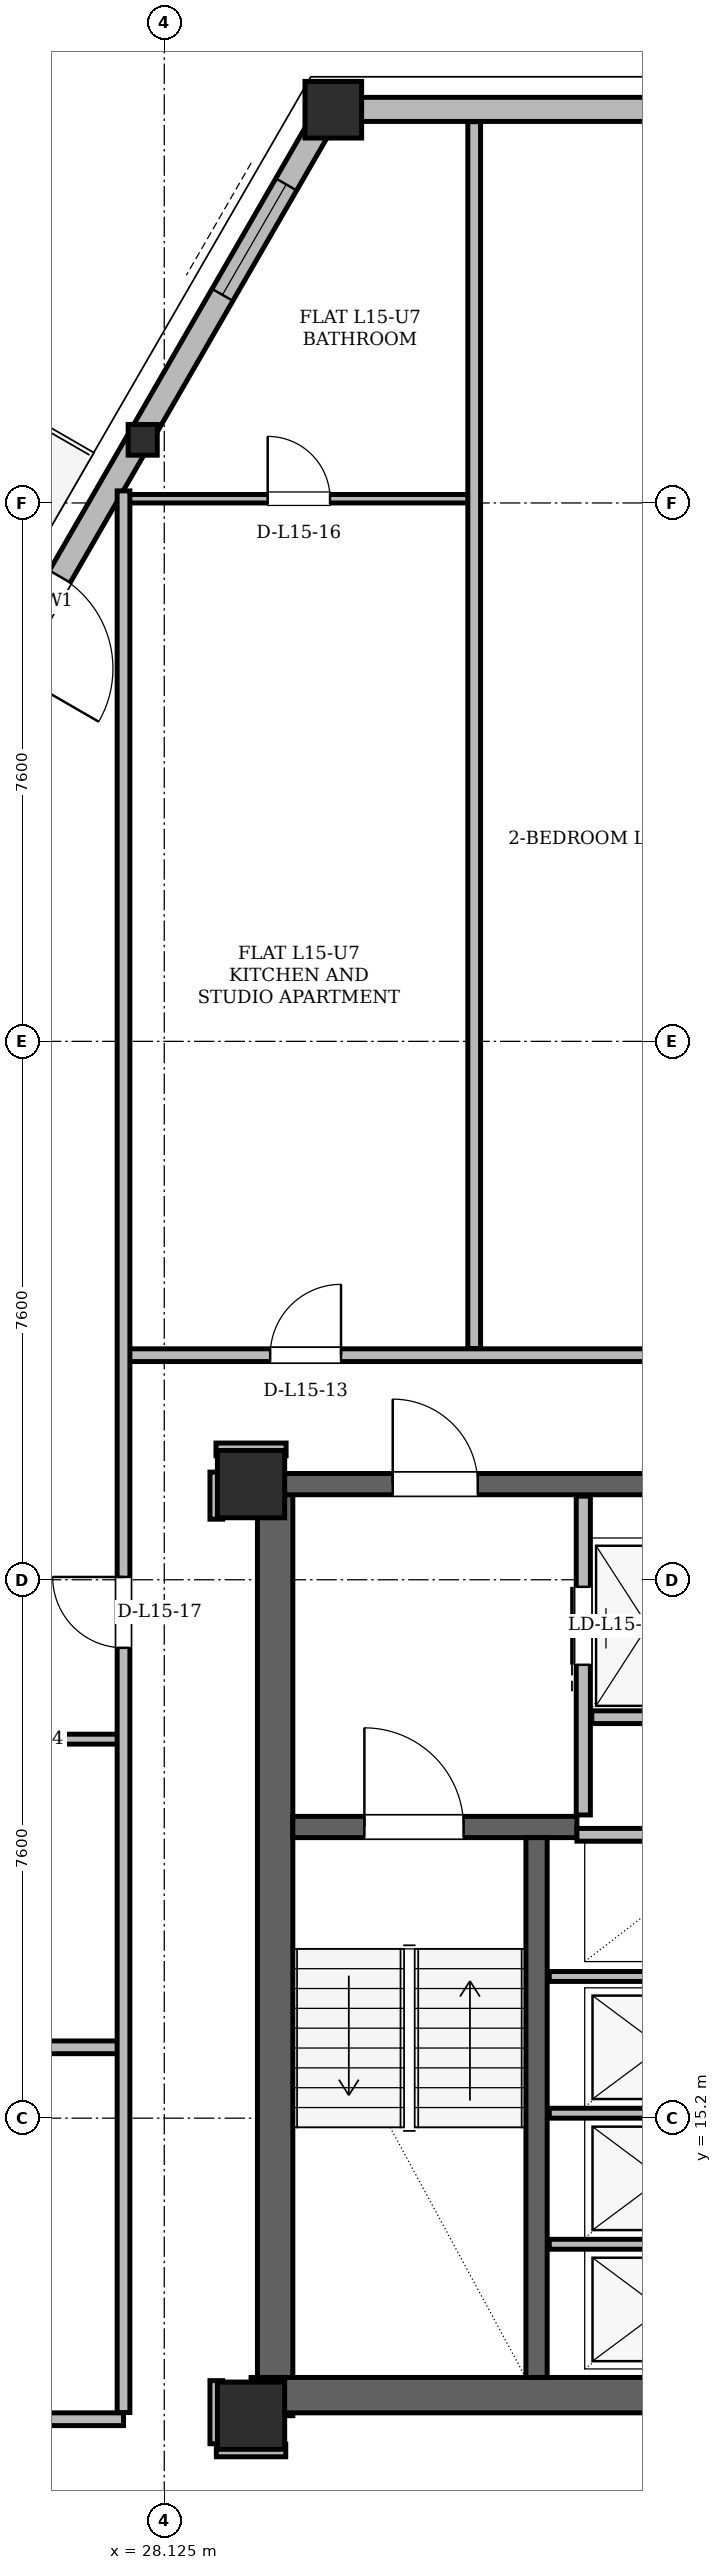
"""IFC4 building model, lengths in metres.
Left out: names, types, materials, properties, quantities, classifications, styles, units other than length and angle.
Written with IfcOpenShell. Run it as: python <this file> out.ifc"""

import sys

from ifc_helpers import new_model, si_unit, direction, frame, frame_2d, origin, origin_2d, place, context, subcontext, project, spatial, rectangle, hollow_rectangle, i_section, extrude, element, fill, save


model = new_model("IFC4")
c1 = context("Model", 3, precision=1e-05, world=origin(), true_north=direction((0.0, 1.0)))
c2 = subcontext(c1, "Body", "Model", "MODEL_VIEW")
j1 = project(units=[si_unit("LENGTHUNIT", "METRE"), si_unit("PLANEANGLEUNIT", "RADIAN")], contexts=[c1])
p1 = place(None, origin())
s1 = spatial("IfcSite", under=j1, at=p1, CompositionType="ELEMENT")
p2 = place(p1, origin())
s2 = spatial("IfcBuilding", under=s1, at=p2, CompositionType="ELEMENT")
p3 = place(p2, frame((0.0, 0.0, 59.7)))
s3 = spatial("IfcBuildingStorey", under=s2, at=p3, CompositionType="ELEMENT", Elevation=59.7)
for number, where, z_axis, x_axis in (
    (1, (29.35, 11.0, 0.0), (0.0, 0.0, 1.0), (1.0, 0.0, 0.0)),
    (2, (29.35, 24.15, 0.0), (0.0, 0.0, 1.0), (1.0, 0.0, 0.0)),
):
    element("IfcColumn", number, at=place(p3, frame(where, z_axis=z_axis, x_axis=x_axis)), inside=s3, PredefinedType="COLUMN", context=c2, shape_type="SweptSolid", body=[
        extrude(hollow_rectangle(XDim=0.95, YDim=0.95, WallThickness=0.08, at=origin_2d()), origin(), (0.0, 0.0, 1.0), 3.6),
    ])
p4 = place(p3, frame((30.458, 43.556, 0.005), z_axis=(0.029494809359, -0.002650455219, 0.999561419478), x_axis=(0.089501110996, 0.995986722367, 0.0)))
e3 = element("IfcColumn", 3, at=p4, inside=s3, PredefinedType="COLUMN", context=c2, shape_type="SweptSolid", body=[
    extrude(hollow_rectangle(XDim=0.8, YDim=0.8, WallThickness=0.065, at=origin_2d()), origin(), (0.0, 0.0, 1.0), 3.592),
])
p5 = place(p3, frame((27.771, 38.902, 0.005), z_axis=(0.027525097831, -0.006048725202, 0.999602812077), x_axis=(0.214631750704, 0.976695045339, 0.0)))
e4 = element("IfcColumn", 4, at=p5, inside=s3, PredefinedType="COLUMN", context=c2, shape_type="SweptSolid", body=[
    extrude(i_section(OverallWidth=0.411, OverallDepth=0.434, WebThickness=0.036, FlangeThickness=0.057, at=origin_2d()), origin(), (0.0, 0.0, 1.0), 3.592),
])
p6 = place(p3, frame((29.69, 11.0, 0.0), z_axis=(0.0, 0.0, 1.0), x_axis=(0.0, 1.0, 0.0)))
e5 = element("IfcWall", 5, at=p6, inside=s3, PredefinedType="SHEAR", context=c2, shape_type="SweptSolid", body=[
    extrude(rectangle(XDim=13.3, YDim=0.5, at=frame_2d((6.65, 0.0))), origin(), (0.0, 0.0, 1.0), 3.36),
])
p7 = place(p3, frame((29.35, 11.29, 0.0), z_axis=(0.0, 0.0, 1.0), x_axis=(1.0, 0.0, 0.0)))
e6 = element("IfcWall", 6, at=p7, inside=s3, PredefinedType="SHEAR", context=c2, shape_type="SweptSolid", body=[
    extrude(rectangle(XDim=7.1, YDim=0.5, at=frame_2d((3.55, 0.0))), origin(), (0.0, 0.0, 1.0), 3.36),
])
p8 = place(p3, frame((29.65, 24.15, 0.0), z_axis=(0.0, 0.0, 1.0), x_axis=(1.0, 0.0, 0.0)))
e7 = element("IfcWall", 7, at=p8, inside=s3, PredefinedType="SHEAR", context=c2, shape_type="SweptSolid", body=[
    extrude(rectangle(XDim=15.7, YDim=0.3, at=frame_2d((7.85, 0.0))), origin(), (0.0, 0.0, 1.0), 3.36),
])
p9 = place(p8, frame((1.7, 0.0, 0.0)))
e8 = element("IfcOpeningElement", 8, at=p9, cuts=e7, PredefinedType="OPENING", context=c2, shape_type="SweptSolid", body=[
    extrude(rectangle(XDim=1.2, YDim=2.2, at=frame_2d((0.6, 1.1))), frame((0.0, 0.15, 0.0), z_axis=(0.0, -1.0, 0.0), x_axis=(1.0, 0.0, 0.0)), (0.0, 0.0, 1.0), 0.3),
])
p10 = place(p8, frame((12.8, 0.0, 0.0)))
e9 = element("IfcOpeningElement", 9, at=p10, cuts=e7, PredefinedType="OPENING", context=c2, shape_type="SweptSolid", body=[
    extrude(rectangle(XDim=1.2, YDim=2.2, at=frame_2d((0.6, 1.1))), frame((0.0, 0.15, 0.0), z_axis=(0.0, -1.0, 0.0), x_axis=(1.0, 0.0, 0.0)), (0.0, 0.0, 1.0), 0.3),
])
p11 = place(p8, frame((6.55, 0.0, 0.0)))
e10 = element("IfcOpeningElement", 10, at=p11, cuts=e7, PredefinedType="OPENING", context=c2, shape_type="SweptSolid", body=[
    extrude(rectangle(XDim=0.9, YDim=2.05, at=frame_2d((0.45, 1.025))), frame((0.0, 0.15, 0.0), z_axis=(0.0, -1.0, 0.0), x_axis=(1.0, 0.0, 0.0)), (0.0, 0.0, 1.0), 0.3),
])
p12 = place(p8, frame((8.45, 0.0, 0.0)))
e11 = element("IfcOpeningElement", 11, at=p12, cuts=e7, PredefinedType="OPENING", context=c2, shape_type="SweptSolid", body=[
    extrude(rectangle(XDim=0.9, YDim=2.05, at=frame_2d((0.45, 1.025))), frame((0.0, 0.15, 0.0), z_axis=(0.0, -1.0, 0.0), x_axis=(1.0, 0.0, 0.0)), (0.0, 0.0, 1.0), 0.3),
])
p13 = place(p3, frame((29.94, 19.31, 0.0), z_axis=(0.0, 0.0, 1.0), x_axis=(1.0, 0.0, 0.0)))
e12 = element("IfcWall", 12, at=p13, inside=s3, PredefinedType="SHEAR", context=c2, shape_type="SweptSolid", body=[
    extrude(rectangle(XDim=4.01, YDim=0.3, at=frame_2d((2.005, 0.0))), origin(), (0.0, 0.0, 1.0), 3.36),
])
p14 = place(p13, frame((1.01, 0.0, 0.0)))
e13 = element("IfcOpeningElement", 13, at=p14, cuts=e12, PredefinedType="OPENING", context=c2, shape_type="SweptSolid", body=[
    extrude(rectangle(XDim=1.4, YDim=2.2, at=frame_2d((0.7, 1.1))), frame((0.0, 0.15, 0.0), z_axis=(0.0, -1.0, 0.0), x_axis=(1.0, 0.0, 0.0)), (0.0, 0.0, 1.0), 0.3),
])
p15 = place(p3, frame((33.38, 11.54, 0.0), z_axis=(0.0, 0.0, 1.0), x_axis=(0.0, 1.0, 0.0)))
e14 = element("IfcWall", 14, at=p15, inside=s3, PredefinedType="SHEAR", context=c2, shape_type="SweptSolid", body=[
    extrude(rectangle(XDim=7.62, YDim=0.3, at=frame_2d((3.81, 0.0))), origin(), (0.0, 0.0, 1.0), 3.36),
])
p16 = place(p3, frame((44.542, 43.556, 0.0), z_axis=(0.0, 0.0, 1.0), x_axis=(-1.0, 0.0, 0.0)))
e15 = element("IfcWall", 15, at=p16, inside=s3, PredefinedType="SOLIDWALL", context=c2, shape_type="SweptSolid", body=[
    extrude(rectangle(XDim=14.083, YDim=0.34, at=frame_2d((7.042, 0.0))), origin(), (0.0, 0.0, 1.0), 2.494),
])
p17 = place(p16, frame((7.992, 0.0, 0.85)))
e16 = element("IfcOpeningElement", 16, at=p17, cuts=e15, PredefinedType="OPENING", context=c2, shape_type="SweptSolid", body=[
    extrude(rectangle(XDim=1.2, YDim=1.48, at=frame_2d((0.6, 0.74))), frame((0.0, 0.17, 0.0), z_axis=(0.0, -1.0, 0.0), x_axis=(1.0, 0.0, 0.0)), (0.0, 0.0, 1.0), 0.34),
])
p18 = place(p3, frame((30.458, 43.556, 0.0), z_axis=(0.0, 0.0, 1.0), x_axis=(-0.499999743921, -0.866025551632, 0.0)))
e17 = element("IfcWall", 17, at=p18, inside=s3, PredefinedType="SOLIDWALL", context=c2, shape_type="SweptSolid", body=[
    extrude(rectangle(XDim=33.585, YDim=0.34, at=frame_2d((16.792, 0.0))), origin(), (0.0, 0.0, 1.0), 2.494),
])
p19 = place(p18, frame((7.615, 0.0, 0.0)))
e18 = element("IfcOpeningElement", 18, at=p19, cuts=e17, PredefinedType="OPENING", context=c2, shape_type="SweptSolid", body=[
    extrude(rectangle(XDim=1.5, YDim=2.2, at=frame_2d((0.75, 1.1))), frame((0.0, 0.17, 0.0), z_axis=(0.0, -1.0, 0.0), x_axis=(1.0, 0.0, 0.0)), (0.0, 0.0, 1.0), 0.34),
])
p20 = place(p18, frame((29.075, 0.0, 0.0)))
e19 = element("IfcOpeningElement", 19, at=p20, cuts=e17, PredefinedType="OPENING", context=c2, shape_type="SweptSolid", body=[
    extrude(rectangle(XDim=1.5, YDim=2.2, at=frame_2d((0.75, 1.1))), frame((0.0, 0.17, 0.0), z_axis=(0.0, -1.0, 0.0), x_axis=(1.0, 0.0, 0.0)), (0.0, 0.0, 1.0), 0.34),
])
p21 = place(p18, frame((11.943, 0.0, 0.85)))
e20 = element("IfcOpeningElement", 20, at=p21, cuts=e17, PredefinedType="OPENING", context=c2, shape_type="SweptSolid", body=[
    extrude(rectangle(XDim=1.8, YDim=1.534, at=frame_2d((0.9, 0.767))), frame((0.0, 0.17, 0.0), z_axis=(0.0, -1.0, 0.0), x_axis=(1.0, 0.0, 0.0)), (0.0, 0.0, 1.0), 0.34),
])
p22 = place(p18, frame((19.036, 0.0, 0.85)))
e21 = element("IfcOpeningElement", 21, at=p22, cuts=e17, PredefinedType="OPENING", context=c2, shape_type="SweptSolid", body=[
    extrude(rectangle(XDim=1.2, YDim=1.48, at=frame_2d((0.6, 0.74))), frame((0.0, 0.17, 0.0), z_axis=(0.0, -1.0, 0.0), x_axis=(1.0, 0.0, 0.0)), (0.0, 0.0, 1.0), 0.34),
])
p23 = place(p18, frame((1.223, 0.0, 0.85)))
e22 = element("IfcOpeningElement", 22, at=p23, cuts=e17, PredefinedType="OPENING", context=c2, shape_type="SweptSolid", body=[
    extrude(rectangle(XDim=1.8, YDim=1.534, at=frame_2d((0.9, 0.767))), frame((0.0, 0.17, 0.0), z_axis=(0.0, -1.0, 0.0), x_axis=(1.0, 0.0, 0.0)), (0.0, 0.0, 1.0), 0.34),
])
p24 = place(p3, frame((34.04, 19.48, 0.0), z_axis=(0.0, 0.0, 1.0), x_axis=(0.0, 1.0, 0.0)))
e23 = element("IfcWall", 23, at=p24, inside=s3, PredefinedType="PARTITIONING", context=c2, shape_type="SweptSolid", body=[
    extrude(rectangle(XDim=4.5, YDim=0.2, at=frame_2d((2.25, 0.0))), origin(), (0.0, 0.0, 1.0), 2.4),
])
p25 = place(p24, frame((2.12, 0.0, 0.0)))
e24 = element("IfcOpeningElement", 24, at=p25, cuts=e23, PredefinedType="OPENING", context=c2, shape_type="SweptSolid", body=[
    extrude(rectangle(XDim=1.1, YDim=2.2, at=frame_2d((0.55, 1.1))), frame((0.0, 0.1, 0.0), z_axis=(0.0, -1.0, 0.0), x_axis=(1.0, 0.0, 0.0)), (0.0, 0.0, 1.0), 0.2),
])
p26 = place(p3, frame((34.16, 20.86, 0.0), z_axis=(0.0, 0.0, 1.0), x_axis=(1.0, 0.0, 0.0)))
e25 = element("IfcWall", 25, at=p26, inside=s3, PredefinedType="PARTITIONING", context=c2, shape_type="SweptSolid", body=[
    extrude(rectangle(XDim=1.58, YDim=0.18, at=frame_2d((0.79, 0.0))), origin(), (0.0, 0.0, 1.0), 3.36),
])
p27 = place(p3, frame((33.95, 19.2, 0.0), z_axis=(0.0, 0.0, 1.0), x_axis=(1.0, 0.0, 0.0)))
e26 = element("IfcWall", 26, at=p27, inside=s3, PredefinedType="PARTITIONING", context=c2, shape_type="SweptSolid", body=[
    extrude(rectangle(XDim=2.27, YDim=0.18, at=frame_2d((1.135, 0.0))), origin(), (0.0, 0.0, 1.0), 3.36),
])
for number, where, z_axis, x_axis in (
    (27, (33.56, 13.42, 0.0), (0.0, 0.0, 1.0), (1.0, 0.0, 0.0)),
    (28, (33.56, 15.27, 0.0), (0.0, 0.0, 1.0), (1.0, 0.0, 0.0)),
    (29, (33.56, 17.2, 0.0), (0.0, 0.0, 1.0), (1.0, 0.0, 0.0)),
):
    element("IfcWall", number, at=place(p3, frame(where, z_axis=z_axis, x_axis=x_axis)), inside=s3, PredefinedType="PARTITIONING", context=c2, shape_type="SweptSolid", body=[
        extrude(rectangle(XDim=2.66, YDim=0.14, at=frame_2d((1.33, 0.0))), origin(), (0.0, 0.0, 1.0), 3.36),
    ])
p28 = place(p3, frame((28.86, 10.51, 0.0), z_axis=(0.0, 0.0, 1.0), x_axis=(1.0, 0.0, 0.0)))
e30 = element("IfcWall", 30, at=p28, inside=s3, PredefinedType="PARTITIONING", context=c2, shape_type="SweptSolid", body=[
    extrude(rectangle(XDim=0.98, YDim=0.18, at=frame_2d((0.49, 0.0))), origin(), (0.0, 0.0, 1.0), 2.738),
])
p29 = place(p3, frame((19.2, 10.95, 0.0), z_axis=(0.0, 0.0, 1.0), x_axis=(1.0, 0.0, 0.0)))
e31 = element("IfcWall", 31, at=p29, inside=s3, PredefinedType="PARTITIONING", context=c2, shape_type="SweptSolid", body=[
    extrude(rectangle(XDim=8.35, YDim=0.18, at=frame_2d((4.175, 0.0))), origin(), (0.0, 0.0, 1.0), 3.36),
])
p30 = place(p3, frame((14.865, 16.2, 0.0), z_axis=(0.0, 0.0, 1.0), x_axis=(1.0, 0.0, 0.0)))
e32 = element("IfcWall", 32, at=p30, inside=s3, PredefinedType="PARTITIONING", context=c2, shape_type="SweptSolid", body=[
    extrude(rectangle(XDim=12.685, YDim=0.18, at=frame_2d((6.342, 0.0))), origin(), (0.0, 0.0, 1.0), 2.946),
])
p31 = place(p3, frame((17.377, 20.55, 0.0), z_axis=(0.0, 0.0, 1.0), x_axis=(1.0, 0.0, 0.0)))
e33 = element("IfcWall", 33, at=p31, inside=s3, PredefinedType="PARTITIONING", context=c2, shape_type="SweptSolid", body=[
    extrude(rectangle(XDim=10.223, YDim=0.14, at=frame_2d((5.112, 0.0))), origin(), (0.0, 0.0, 1.0), 3.36),
])
p32 = place(p31, frame((0.462, 0.0, 0.0)))
e34 = element("IfcOpeningElement", 34, at=p32, cuts=e33, PredefinedType="OPENING", context=c2, shape_type="SweptSolid", body=[
    extrude(rectangle(XDim=0.88, YDim=2.08, at=frame_2d((0.44, 1.04))), frame((0.0, 0.07, 0.0), z_axis=(0.0, -1.0, 0.0), x_axis=(1.0, 0.0, 0.0)), (0.0, 0.0, 1.0), 0.14),
])
p33 = place(p31, frame((2.412, 0.0, 0.0)))
e35 = element("IfcOpeningElement", 35, at=p33, cuts=e33, PredefinedType="OPENING", context=c2, shape_type="SweptSolid", body=[
    extrude(rectangle(XDim=0.95, YDim=2.1, at=frame_2d((0.475, 1.05))), frame((0.0, 0.07, 0.0), z_axis=(0.0, -1.0, 0.0), x_axis=(1.0, 0.0, 0.0)), (0.0, 0.0, 1.0), 0.14),
])
p34 = place(p31, frame((6.598, 0.0, 0.0)))
e36 = element("IfcOpeningElement", 36, at=p34, cuts=e33, PredefinedType="OPENING", context=c2, shape_type="SweptSolid", body=[
    extrude(rectangle(XDim=0.92, YDim=2.12, at=frame_2d((0.46, 1.06))), frame((0.0, 0.07, 0.0), z_axis=(0.0, -1.0, 0.0), x_axis=(1.0, 0.0, 0.0)), (0.0, 0.0, 1.0), 0.14),
])
p35 = place(p3, frame((28.855, 24.64, 0.0), z_axis=(0.0, 0.0, 1.0), x_axis=(1.0, 0.0, 0.0)))
e37 = element("IfcWall", 37, at=p35, inside=s3, PredefinedType="PARTITIONING", context=c2, shape_type="SweptSolid", body=[
    extrude(rectangle(XDim=0.99, YDim=0.18, at=frame_2d((0.495, 0.0))), origin(), (0.0, 0.0, 1.0), 2.738),
])
p36 = place(p3, frame((27.55, 25.97, 0.0), z_axis=(0.0, 0.0, 1.0), x_axis=(1.0, 0.0, 0.0)))
e38 = element("IfcWall", 38, at=p36, inside=s3, PredefinedType="PARTITIONING", context=c2, shape_type="SweptSolid", body=[
    extrude(rectangle(XDim=19.9, YDim=0.18, at=frame_2d((9.95, 0.0))), origin(), (0.0, 0.0, 1.0), 2.738),
])
p37 = place(p36, frame((2.07, 0.0, 0.0)))
e39 = element("IfcOpeningElement", 39, at=p37, cuts=e38, PredefinedType="OPENING", context=c2, shape_type="SweptSolid", body=[
    extrude(rectangle(XDim=1.0, YDim=2.18, at=frame_2d((0.5, 1.09))), frame((0.0, 0.09, 0.0), z_axis=(0.0, -1.0, 0.0), x_axis=(1.0, 0.0, 0.0)), (0.0, 0.0, 1.0), 0.18),
])
p38 = place(p36, frame((7.851, 0.0, 0.0)))
e40 = element("IfcOpeningElement", 40, at=p38, cuts=e38, PredefinedType="OPENING", context=c2, shape_type="SweptSolid", body=[
    extrude(rectangle(XDim=1.0, YDim=2.18, at=frame_2d((0.5, 1.09))), frame((0.0, 0.09, 0.0), z_axis=(0.0, -1.0, 0.0), x_axis=(1.0, 0.0, 0.0)), (0.0, 0.0, 1.0), 0.18),
])
p39 = place(p36, frame((16.916, 0.0, 0.0)))
e41 = element("IfcOpeningElement", 41, at=p39, cuts=e38, PredefinedType="OPENING", context=c2, shape_type="SweptSolid", body=[
    extrude(rectangle(XDim=1.0, YDim=2.18, at=frame_2d((0.5, 1.09))), frame((0.0, 0.09, 0.0), z_axis=(0.0, -1.0, 0.0), x_axis=(1.0, 0.0, 0.0)), (0.0, 0.0, 1.0), 0.18),
])
p40 = place(p3, frame((27.486, 38.06, 0.0), z_axis=(0.0, 0.0, 1.0), x_axis=(1.0, 0.0, 0.0)))
e42 = element("IfcWall", 42, at=p40, inside=s3, PredefinedType="PARTITIONING", context=c2, shape_type="SweptSolid", body=[
    extrude(rectangle(XDim=5.096, YDim=0.12, at=frame_2d((2.548, 0.0))), origin(), (0.0, 0.0, 1.0), 2.738),
])
p41 = place(p40, frame((2.099, 0.0, 0.0)))
e43 = element("IfcOpeningElement", 43, at=p41, cuts=e42, PredefinedType="OPENING", context=c2, shape_type="SweptSolid", body=[
    extrude(rectangle(XDim=0.88, YDim=2.08, at=frame_2d((0.44, 1.04))), frame((0.0, 0.06, 0.0), z_axis=(0.0, -1.0, 0.0), x_axis=(1.0, 0.0, 0.0)), (0.0, 0.0, 1.0), 0.12),
])
p42 = place(p3, frame((27.55, 11.044, 0.0), z_axis=(0.0, 0.0, 1.0), x_axis=(0.0, 1.0, 0.0)))
e44 = element("IfcWall", 44, at=p42, inside=s3, PredefinedType="PARTITIONING", context=c2, shape_type="SweptSolid", body=[
    extrude(rectangle(XDim=27.127, YDim=0.18, at=frame_2d((13.563, 0.0))), origin(), (0.0, 0.0, 1.0), 2.494),
])
p43 = place(p42, frame((10.795, 0.0, 0.0)))
e45 = element("IfcOpeningElement", 45, at=p43, cuts=e44, PredefinedType="OPENING", context=c2, shape_type="SweptSolid", body=[
    extrude(rectangle(XDim=1.0, YDim=2.18, at=frame_2d((0.5, 1.09))), frame((0.0, 0.09, 0.0), z_axis=(0.0, -1.0, 0.0), x_axis=(1.0, 0.0, 0.0)), (0.0, 0.0, 1.0), 0.18),
])
p44 = place(p3, frame((28.86, 10.604, 0.0), z_axis=(0.0, 0.0, 1.0), x_axis=(0.0, 1.0, 0.0)))
e46 = element("IfcWall", 46, at=p44, inside=s3, PredefinedType="PARTITIONING", context=c2, shape_type="SweptSolid", body=[
    extrude(rectangle(XDim=0.891, YDim=0.18, at=frame_2d((0.446, 0.0))), origin(), (0.0, 0.0, 1.0), 2.738),
])
p45 = place(p3, frame((28.86, 23.655, 0.0), z_axis=(0.0, 0.0, 1.0), x_axis=(0.0, 1.0, 0.0)))
e47 = element("IfcWall", 47, at=p45, inside=s3, PredefinedType="PARTITIONING", context=c2, shape_type="SweptSolid", body=[
    extrude(rectangle(XDim=0.665, YDim=0.18, at=frame_2d((0.333, 0.0))), origin(), (0.0, 0.0, 1.0), 2.946),
])
p46 = place(p3, frame((32.5, 26.064, 0.0), z_axis=(0.0, 0.0, 1.0), x_axis=(0.0, 1.0, 0.0)))
e48 = element("IfcWall", 48, at=p46, inside=s3, PredefinedType="PARTITIONING", context=c2, shape_type="SweptSolid", body=[
    extrude(rectangle(XDim=17.318, YDim=0.18, at=frame_2d((8.659, 0.0))), origin(), (0.0, 0.0, 1.0), 3.36),
])
p47 = place(p19, origin())
e49 = element("IfcDoor", 49, at=p47, inside=s3, OperationType="SINGLE_SWING_RIGHT", PredefinedType="DOOR", context=c2, shape_type="SweptSolid", body=[
    extrude(rectangle(XDim=1.5, YDim=2.2, at=frame_2d((0.75, 1.1))), frame((0.0, 0.025, 0.0), z_axis=(0.0, -1.0, 0.0), x_axis=(1.0, 0.0, 0.0)), (0.0, 0.0, 1.0), 0.05),
])
fill(e18, e49)
p48 = place(p23, origin())
e50 = element("IfcWindow", 50, at=p48, inside=s3, PartitioningType="SINGLE_PANEL", PredefinedType="WINDOW", context=c2, shape_type="SweptSolid", body=[
    extrude(rectangle(XDim=1.8, YDim=1.534, at=frame_2d((0.9, 0.767))), frame((0.0, 0.03, 0.0), z_axis=(0.0, -1.0, 0.0), x_axis=(1.0, 0.0, 0.0)), (0.0, 0.0, 1.0), 0.06),
])
fill(e22, e50)
p49 = place(p25, origin())
e51 = element("IfcDoor", 51, at=p49, inside=s3, OperationType="SLIDING_TO_LEFT", PredefinedType="DOOR", context=c2, shape_type="SweptSolid", body=[
    extrude(rectangle(XDim=1.1, YDim=2.2, at=frame_2d((0.55, 1.1))), frame((0.0, 0.025, 0.0), z_axis=(0.0, -1.0, 0.0), x_axis=(1.0, 0.0, 0.0)), (0.0, 0.0, 1.0), 0.05),
])
fill(e24, e51)
p50 = place(p14, origin())
e52 = element("IfcDoor", 52, at=p50, inside=s3, OperationType="SINGLE_SWING_LEFT", PredefinedType="DOOR", context=c2, shape_type="SweptSolid", body=[
    extrude(rectangle(XDim=1.4, YDim=2.2, at=frame_2d((0.7, 1.1))), frame((0.0, 0.025, 0.0), z_axis=(0.0, -1.0, 0.0), x_axis=(1.0, 0.0, 0.0)), (0.0, 0.0, 1.0), 0.05),
])
fill(e13, e52)
p51 = place(p9, origin())
e53 = element("IfcDoor", 53, at=p51, inside=s3, OperationType="SINGLE_SWING_LEFT", PredefinedType="DOOR", context=c2, shape_type="SweptSolid", body=[
    extrude(rectangle(XDim=1.2, YDim=2.2, at=frame_2d((0.6, 1.1))), frame((0.0, 0.025, 0.0), z_axis=(0.0, -1.0, 0.0), x_axis=(1.0, 0.0, 0.0)), (0.0, 0.0, 1.0), 0.05),
])
fill(e8, e53)
p52 = place(p37, origin())
e54 = element("IfcDoor", 54, at=p52, inside=s3, OperationType="SINGLE_SWING_RIGHT", PredefinedType="DOOR", context=c2, shape_type="SweptSolid", body=[
    extrude(rectangle(XDim=1.0, YDim=2.18, at=frame_2d((0.5, 1.09))), frame((0.0, 0.025, 0.0), z_axis=(0.0, -1.0, 0.0), x_axis=(1.0, 0.0, 0.0)), (0.0, 0.0, 1.0), 0.05),
])
fill(e39, e54)
p53 = place(p41, origin())
e55 = element("IfcDoor", 55, at=p53, inside=s3, OperationType="SINGLE_SWING_LEFT", PredefinedType="DOOR", context=c2, shape_type="SweptSolid", body=[
    extrude(rectangle(XDim=0.88, YDim=2.08, at=frame_2d((0.44, 1.04))), frame((0.0, 0.025, 0.0), z_axis=(0.0, -1.0, 0.0), x_axis=(1.0, 0.0, 0.0)), (0.0, 0.0, 1.0), 0.05),
])
fill(e43, e55)
p54 = place(p43, origin())
e56 = element("IfcDoor", 56, at=p54, inside=s3, OperationType="SINGLE_SWING_RIGHT", PredefinedType="DOOR", context=c2, shape_type="SweptSolid", body=[
    extrude(rectangle(XDim=1.0, YDim=2.18, at=frame_2d((0.5, 1.09))), frame((0.0, 0.025, 0.0), z_axis=(0.0, -1.0, 0.0), x_axis=(1.0, 0.0, 0.0)), (0.0, 0.0, 1.0), 0.05),
])
fill(e45, e56)
save(model, sys.argv[1])
